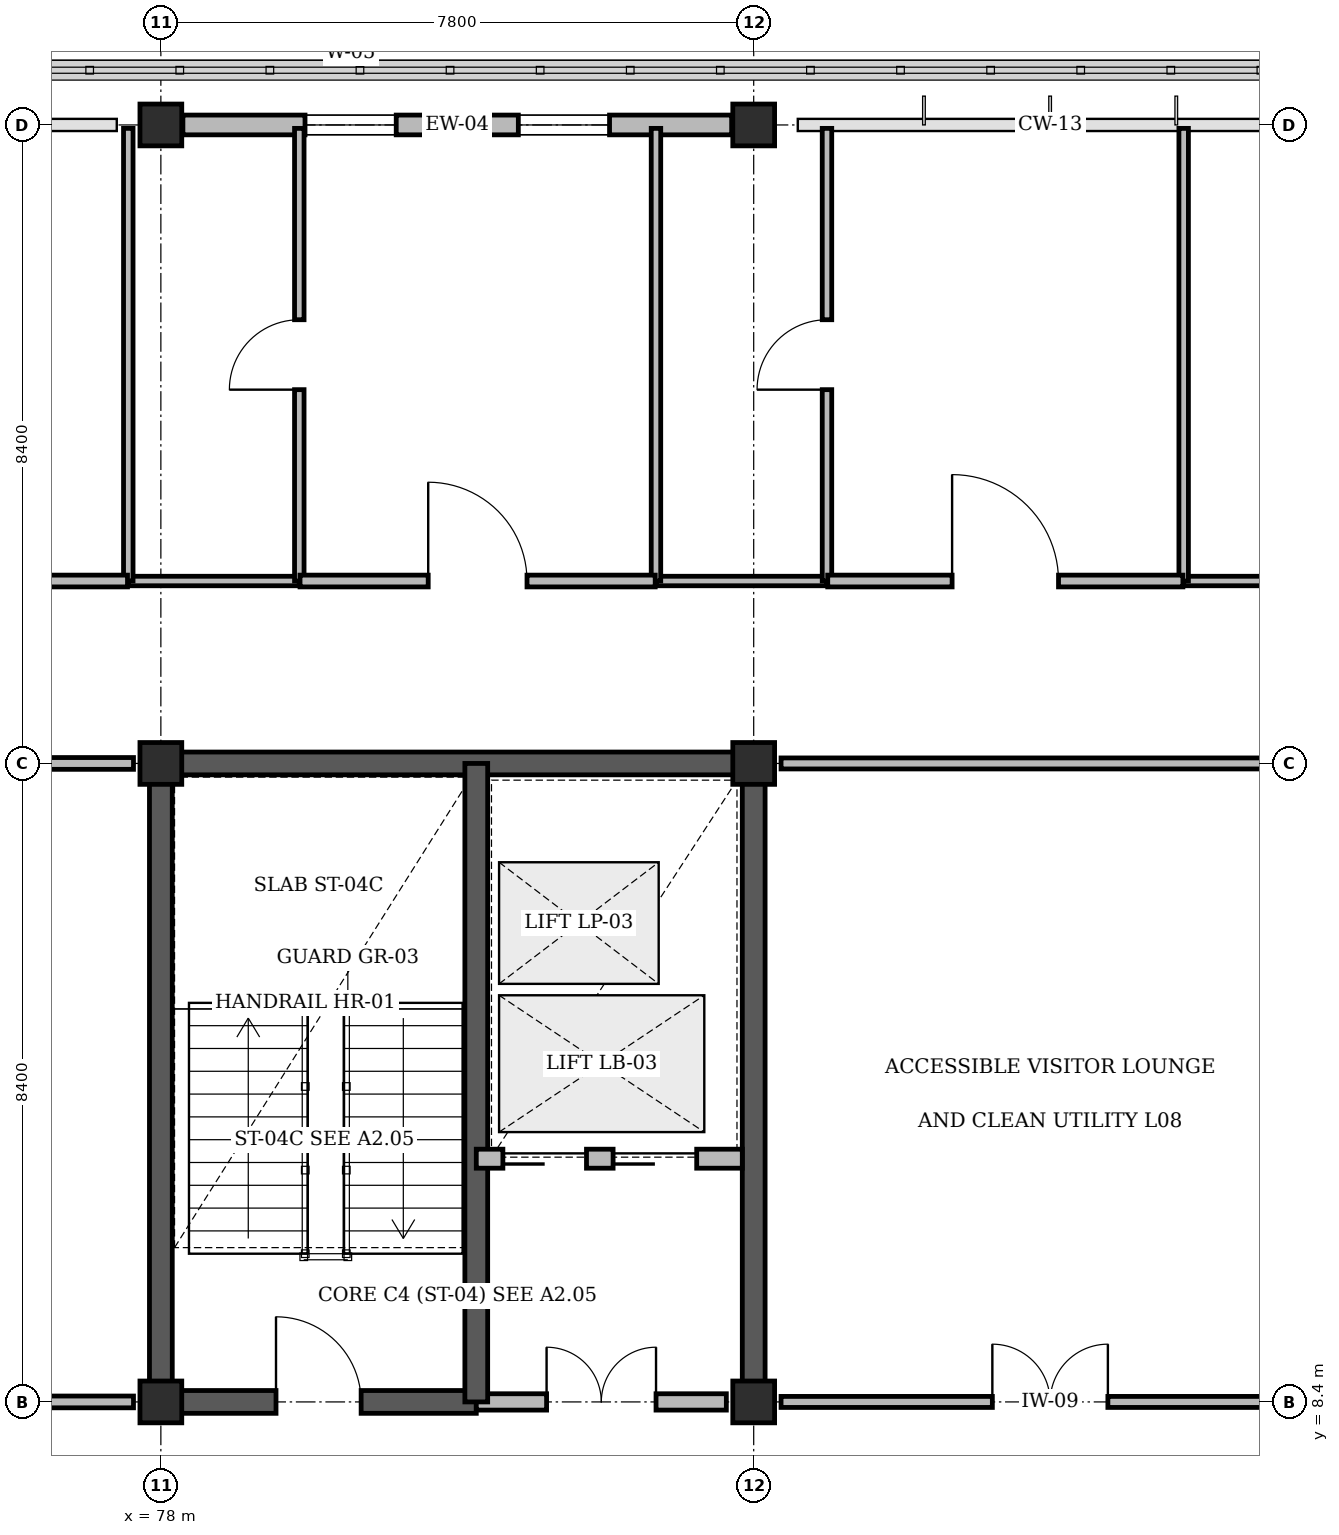
"""IFC4 building model, lengths in metres.
Left out: names, types, materials, properties, quantities, classifications, styles, units other than length and angle.
Written with IfcOpenShell. Run it as: python <this file> out.ifc"""

import sys

from ifc_helpers import new_model, si_unit, direction, frame, frame_2d, origin, origin_2d, place, context, subcontext, project, spatial, rectangle, extrude, element, fill, save


model = new_model("IFC4")
c1 = context("Model", 3, precision=1e-05, world=origin(), true_north=direction((0.0, 1.0)))
c2 = subcontext(c1, "Body", "Model", "MODEL_VIEW")
j1 = project(units=[si_unit("LENGTHUNIT", "METRE"), si_unit("PLANEANGLEUNIT", "RADIAN")], contexts=[c1])
p1 = place(None, origin())
s1 = spatial("IfcSite", under=j1, at=p1, CompositionType="ELEMENT")
p2 = place(p1, origin())
s2 = spatial("IfcBuilding", under=s1, at=p2, CompositionType="ELEMENT")
p3 = place(p2, frame((0.0, 0.0, 34.8)))
s3 = spatial("IfcBuildingStorey", under=s2, at=p3, CompositionType="ELEMENT", Elevation=34.8)
p4 = place(p3, frame((77.85, 16.8, 0.0), z_axis=(0.0, 0.0, 1.0), x_axis=(1.0, 0.0, 0.0)))
e1 = element("IfcWall", 1, at=p4, inside=s3, PredefinedType="SHEAR", context=c2, shape_type="SweptSolid", body=[
    extrude(rectangle(XDim=8.1, YDim=0.3, at=frame_2d((4.05, 0.0))), origin(), (0.0, 0.0, 1.0), 3.92),
])
for number, where, z_axis, x_axis in (
    (2, (78.0, 8.4, 0.0), (0.0, 0.0, 1.0), (0.0, 1.0, 0.0)),
    (3, (85.8, 8.4, 0.0), (0.0, 0.0, 1.0), (0.0, 1.0, 0.0)),
):
    element("IfcWall", number, at=place(p3, frame(where, z_axis=z_axis, x_axis=x_axis)), inside=s3, PredefinedType="SHEAR", context=c2, shape_type="SweptSolid", body=[
        extrude(rectangle(XDim=8.4, YDim=0.3, at=frame_2d((4.2, 0.0))), origin(), (0.0, 0.0, 1.0), 3.92),
    ])
for number, where, z_axis, x_axis in (
    (4, (78.0, 8.4, 0.0), (0.0, 0.0, 1.0), (1.0, 0.0, 0.0)),
    (5, (78.0, 16.8, 0.0), (0.0, 0.0, 1.0), (1.0, 0.0, 0.0)),
    (6, (78.0, 25.2, 0.0), (0.0, 0.0, 1.0), (1.0, 0.0, 0.0)),
    (7, (85.8, 8.4, 0.0), (0.0, 0.0, 1.0), (1.0, 0.0, 0.0)),
    (8, (85.8, 16.8, 0.0), (0.0, 0.0, 1.0), (1.0, 0.0, 0.0)),
    (9, (85.8, 25.2, 0.0), (0.0, 0.0, 1.0), (1.0, 0.0, 0.0)),
):
    element("IfcColumn", number, at=place(p3, frame(where, z_axis=z_axis, x_axis=x_axis)), inside=s3, PredefinedType="COLUMN", context=c2, shape_type="SweptSolid", body=[
        extrude(rectangle(XDim=0.55, YDim=0.55, at=origin_2d()), origin(), (0.0, 0.0, 1.0), 4.2),
    ])
p5 = place(p3, frame((78.29, 25.2, 0.0), z_axis=(0.0, 0.0, 1.0), x_axis=(1.0, 0.0, 0.0)))
e10 = element("IfcWall", 10, at=p5, inside=s3, PredefinedType="STANDARD", context=c2, shape_type="SweptSolid", body=[
    extrude(rectangle(XDim=7.22, YDim=0.26, at=frame_2d((3.61, 0.0))), origin(), (0.0, 0.0, 1.0), 3.355),
])
p6 = place(p5, frame((1.607, 0.0, 0.85)))
e11 = element("IfcOpeningElement", 11, at=p6, cuts=e10, PredefinedType="OPENING", context=c2, shape_type="SweptSolid", body=[
    extrude(rectangle(XDim=1.2, YDim=1.5, at=frame_2d((0.6, 0.75))), frame((0.0, 0.14, 0.0), z_axis=(0.0, -1.0, 0.0), x_axis=(1.0, 0.0, 0.0)), (0.0, 0.0, 1.0), 0.28),
])
p7 = place(p5, frame((4.413, 0.0, 0.85)))
e12 = element("IfcOpeningElement", 12, at=p7, cuts=e10, PredefinedType="OPENING", context=c2, shape_type="SweptSolid", body=[
    extrude(rectangle(XDim=1.2, YDim=1.5, at=frame_2d((0.6, 0.75))), frame((0.0, 0.14, 0.0), z_axis=(0.0, -1.0, 0.0), x_axis=(1.0, 0.0, 0.0)), (0.0, 0.0, 1.0), 0.28),
])
p8 = place(p3, frame((78.0, 8.4, 0.0), z_axis=(0.0, 0.0, 1.0), x_axis=(1.0, 0.0, 0.0)))
e13 = element("IfcWall", 13, at=p8, inside=s3, PredefinedType="SHEAR", context=c2, shape_type="SweptSolid", body=[
    extrude(rectangle(XDim=4.15, YDim=0.3, at=frame_2d((2.075, 0.0))), origin(), (0.0, 0.0, 1.0), 4.2),
])
p9 = place(p8, frame((1.515, 0.0, 0.0)))
e14 = element("IfcOpeningElement", 14, at=p9, cuts=e13, PredefinedType="OPENING", context=c2, shape_type="SweptSolid", body=[
    extrude(rectangle(XDim=1.12, YDim=2.15, at=frame_2d((0.56, 1.075))), frame((0.0, 0.16, 0.0), z_axis=(0.0, -1.0, 0.0), x_axis=(1.0, 0.0, 0.0)), (0.0, 0.0, 1.0), 0.32),
])
p10 = place(p3, frame((82.15, 8.4, 0.0), z_axis=(0.0, 0.0, 1.0), x_axis=(1.0, 0.0, 0.0)))
e15 = element("IfcWall", 15, at=p10, inside=s3, PredefinedType="STANDARD", context=c2, shape_type="SweptSolid", body=[
    extrude(rectangle(XDim=3.29, YDim=0.215, at=frame_2d((1.645, 0.0))), origin(), (0.0, 0.0, 1.0), 3.32),
])
p11 = place(p10, frame((0.925, 0.0, 0.0)))
e16 = element("IfcOpeningElement", 16, at=p11, cuts=e15, PredefinedType="OPENING", context=c2, shape_type="SweptSolid", body=[
    extrude(rectangle(XDim=1.44, YDim=2.2, at=frame_2d((0.72, 1.1))), frame((0.0, 0.118, 0.0), z_axis=(0.0, -1.0, 0.0), x_axis=(1.0, 0.0, 0.0)), (0.0, 0.0, 1.0), 0.235),
])
p12 = place(p3, frame((82.15, 8.4, 0.0), z_axis=(0.0, 0.0, 1.0), x_axis=(0.0, 1.0, 0.0)))
e17 = element("IfcWall", 17, at=p12, inside=s3, PredefinedType="SHEAR", context=c2, shape_type="SweptSolid", body=[
    extrude(rectangle(XDim=8.4, YDim=0.3, at=frame_2d((4.2, 0.0))), origin(), (0.0, 0.0, 1.0), 4.2),
])
p13 = place(p3, frame((82.15, 11.6, 0.0), z_axis=(0.0, 0.0, 1.0), x_axis=(1.0, 0.0, 0.0)))
e18 = element("IfcWall", 18, at=p13, inside=s3, PredefinedType="STANDARD", context=c2, shape_type="SweptSolid", body=[
    extrude(rectangle(XDim=3.5, YDim=0.25, at=frame_2d((1.75, 0.0))), origin(), (0.0, 0.0, 1.0), 3.9),
])
p14 = place(p13, frame((0.35, 0.0, 0.0)))
e19 = element("IfcOpeningElement", 19, at=p14, cuts=e18, PredefinedType="OPENING", context=c2, shape_type="SweptSolid", body=[
    extrude(rectangle(XDim=1.1, YDim=2.2, at=frame_2d((0.55, 1.1))), frame((0.0, 0.135, 0.0), z_axis=(0.0, -1.0, 0.0), x_axis=(1.0, 0.0, 0.0)), (0.0, 0.0, 1.0), 0.27),
])
p15 = place(p13, frame((1.8, 0.0, 0.0)))
e20 = element("IfcOpeningElement", 20, at=p15, cuts=e18, PredefinedType="OPENING", context=c2, shape_type="SweptSolid", body=[
    extrude(rectangle(XDim=1.1, YDim=2.2, at=frame_2d((0.55, 1.1))), frame((0.0, 0.135, 0.0), z_axis=(0.0, -1.0, 0.0), x_axis=(1.0, 0.0, 0.0)), (0.0, 0.0, 1.0), 0.27),
])
p16 = place(p3, frame((77.571, 19.2, 0.0), z_axis=(0.0, 0.0, 1.0), x_axis=(1.0, 0.0, 0.0)))
e21 = element("IfcWall", 21, at=p16, inside=s3, PredefinedType="PARTITIONING", context=c2, shape_type="SweptSolid", body=[
    extrude(rectangle(XDim=2.25, YDim=0.125, at=frame_2d((1.125, 0.0))), origin(), (0.0, 0.0, 1.0), 3.9),
])
p17 = place(p3, frame((77.571, 19.2, 0.0), z_axis=(0.0, 0.0, 1.0), x_axis=(0.0, 1.0, 0.0)))
e22 = element("IfcWall", 22, at=p17, inside=s3, PredefinedType="PARTITIONING", context=c2, shape_type="SweptSolid", body=[
    extrude(rectangle(XDim=5.955, YDim=0.125, at=frame_2d((2.978, 0.0))), origin(), (0.0, 0.0, 1.0), 3.32),
])
p18 = place(p3, frame((79.821, 19.2, 0.0), z_axis=(0.0, 0.0, 1.0), x_axis=(0.0, 1.0, 0.0)))
e23 = element("IfcWall", 23, at=p18, inside=s3, PredefinedType="PARTITIONING", context=c2, shape_type="SweptSolid", body=[
    extrude(rectangle(XDim=5.955, YDim=0.125, at=frame_2d((2.978, 0.0))), origin(), (0.0, 0.0, 1.0), 3.9),
])
p19 = place(p18, frame((2.518, 0.0, 0.0)))
e24 = element("IfcOpeningElement", 24, at=p19, cuts=e23, PredefinedType="OPENING", context=c2, shape_type="SweptSolid", body=[
    extrude(rectangle(XDim=0.92, YDim=2.1, at=frame_2d((0.46, 1.05))), frame((0.0, 0.073, 0.0), z_axis=(0.0, -1.0, 0.0), x_axis=(1.0, 0.0, 0.0)), (0.0, 0.0, 1.0), 0.145),
])
p20 = place(p3, frame((84.514, 19.2, 0.0), z_axis=(0.0, 0.0, 1.0), x_axis=(1.0, 0.0, 0.0)))
e25 = element("IfcWall", 25, at=p20, inside=s3, PredefinedType="PARTITIONING", context=c2, shape_type="SweptSolid", body=[
    extrude(rectangle(XDim=2.25, YDim=0.125, at=frame_2d((1.125, 0.0))), origin(), (0.0, 0.0, 1.0), 3.9),
])
p21 = place(p3, frame((84.514, 19.2, 0.0), z_axis=(0.0, 0.0, 1.0), x_axis=(0.0, 1.0, 0.0)))
e26 = element("IfcWall", 26, at=p21, inside=s3, PredefinedType="PARTITIONING", context=c2, shape_type="SweptSolid", body=[
    extrude(rectangle(XDim=5.955, YDim=0.125, at=frame_2d((2.978, 0.0))), origin(), (0.0, 0.0, 1.0), 3.9),
])
p22 = place(p3, frame((86.764, 19.2, 0.0), z_axis=(0.0, 0.0, 1.0), x_axis=(0.0, 1.0, 0.0)))
e27 = element("IfcWall", 27, at=p22, inside=s3, PredefinedType="PARTITIONING", context=c2, shape_type="SweptSolid", body=[
    extrude(rectangle(XDim=5.955, YDim=0.125, at=frame_2d((2.978, 0.0))), origin(), (0.0, 0.0, 1.0), 3.9),
])
p23 = place(p22, frame((2.518, 0.0, 0.0)))
e28 = element("IfcOpeningElement", 28, at=p23, cuts=e27, PredefinedType="OPENING", context=c2, shape_type="SweptSolid", body=[
    extrude(rectangle(XDim=0.92, YDim=2.1, at=frame_2d((0.46, 1.05))), frame((0.0, 0.073, 0.0), z_axis=(0.0, -1.0, 0.0), x_axis=(1.0, 0.0, 0.0)), (0.0, 0.0, 1.0), 0.145),
])
p24 = place(p3, frame((91.457, 19.2, 0.0), z_axis=(0.0, 0.0, 1.0), x_axis=(1.0, 0.0, 0.0)))
e29 = element("IfcWall", 29, at=p24, inside=s3, PredefinedType="PARTITIONING", context=c2, shape_type="SweptSolid", body=[
    extrude(rectangle(XDim=2.25, YDim=0.125, at=frame_2d((1.125, 0.0))), origin(), (0.0, 0.0, 1.0), 3.9),
])
p25 = place(p3, frame((91.457, 19.2, 0.0), z_axis=(0.0, 0.0, 1.0), x_axis=(0.0, 1.0, 0.0)))
e30 = element("IfcWall", 30, at=p25, inside=s3, PredefinedType="PARTITIONING", context=c2, shape_type="SweptSolid", body=[
    extrude(rectangle(XDim=5.955, YDim=0.125, at=frame_2d((2.978, 0.0))), origin(), (0.0, 0.0, 1.0), 3.9),
])
p26 = place(p3, frame((72.889, 19.2, 0.0), z_axis=(0.0, 0.0, 1.0), x_axis=(1.0, 0.0, 0.0)))
e31 = element("IfcWall", 31, at=p26, inside=s3, PredefinedType="PARTITIONING", context=c2, shape_type="SweptSolid", body=[
    extrude(rectangle(XDim=4.672, YDim=0.155, at=frame_2d((2.336, 0.0))), origin(), (0.0, 0.0, 1.0), 3.9),
])
p27 = place(p26, frame((1.636, 0.0, 0.0)))
e32 = element("IfcOpeningElement", 32, at=p27, cuts=e31, PredefinedType="OPENING", context=c2, shape_type="SweptSolid", body=[
    extrude(rectangle(XDim=1.4, YDim=2.2, at=frame_2d((0.7, 1.1))), frame((0.0, 0.087, 0.0), z_axis=(0.0, -1.0, 0.0), x_axis=(1.0, 0.0, 0.0)), (0.0, 0.0, 1.0), 0.175),
])
p28 = place(p3, frame((79.831, 19.2, 0.0), z_axis=(0.0, 0.0, 1.0), x_axis=(1.0, 0.0, 0.0)))
e33 = element("IfcWall", 33, at=p28, inside=s3, PredefinedType="PARTITIONING", context=c2, shape_type="SweptSolid", body=[
    extrude(rectangle(XDim=4.673, YDim=0.155, at=frame_2d((2.336, 0.0))), origin(), (0.0, 0.0, 1.0), 3.9),
])
p29 = place(p28, frame((1.687, 0.0, 0.0)))
e34 = element("IfcOpeningElement", 34, at=p29, cuts=e33, PredefinedType="OPENING", context=c2, shape_type="SweptSolid", body=[
    extrude(rectangle(XDim=1.3, YDim=2.15, at=frame_2d((0.65, 1.075))), frame((0.0, 0.087, 0.0), z_axis=(0.0, -1.0, 0.0), x_axis=(1.0, 0.0, 0.0)), (0.0, 0.0, 1.0), 0.175),
])
p30 = place(p3, frame((86.774, 19.2, 0.0), z_axis=(0.0, 0.0, 1.0), x_axis=(1.0, 0.0, 0.0)))
e35 = element("IfcWall", 35, at=p30, inside=s3, PredefinedType="PARTITIONING", context=c2, shape_type="SweptSolid", body=[
    extrude(rectangle(XDim=4.673, YDim=0.155, at=frame_2d((2.336, 0.0))), origin(), (0.0, 0.0, 1.0), 3.9),
])
p31 = place(p30, frame((1.636, 0.0, 0.0)))
e36 = element("IfcOpeningElement", 36, at=p31, cuts=e35, PredefinedType="OPENING", context=c2, shape_type="SweptSolid", body=[
    extrude(rectangle(XDim=1.4, YDim=2.2, at=frame_2d((0.7, 1.1))), frame((0.0, 0.087, 0.0), z_axis=(0.0, -1.0, 0.0), x_axis=(1.0, 0.0, 0.0)), (0.0, 0.0, 1.0), 0.175),
])
for number, where, z_axis, x_axis in (
    (37, (73.2, 8.4, 0.0), (0.0, 0.0, 1.0), (1.0, 0.0, 0.0)),
    (38, (73.2, 16.8, 0.0), (0.0, 0.0, 1.0), (1.0, 0.0, 0.0)),
):
    element("IfcWall", number, at=place(p3, frame(where, z_axis=z_axis, x_axis=x_axis)), inside=s3, PredefinedType="PARTITIONING", context=c2, shape_type="SweptSolid", body=[
        extrude(rectangle(XDim=4.44, YDim=0.155, at=frame_2d((2.22, 0.0))), origin(), (0.0, 0.0, 1.0), 3.32),
    ])
p32 = place(p3, frame((86.16, 8.4, 0.0), z_axis=(0.0, 0.0, 1.0), x_axis=(1.0, 0.0, 0.0)))
e39 = element("IfcWall", 39, at=p32, inside=s3, PredefinedType="PARTITIONING", context=c2, shape_type="SweptSolid", body=[
    extrude(rectangle(XDim=7.08, YDim=0.145, at=frame_2d((3.54, 0.0))), origin(), (0.0, 0.0, 1.0), 3.32),
])
p33 = place(p32, frame((2.78, 0.0, 0.0)))
e40 = element("IfcOpeningElement", 40, at=p33, cuts=e39, PredefinedType="OPENING", context=c2, shape_type="SweptSolid", body=[
    extrude(rectangle(XDim=1.52, YDim=2.2, at=frame_2d((0.76, 1.1))), frame((0.0, 0.083, 0.0), z_axis=(0.0, -1.0, 0.0), x_axis=(1.0, 0.0, 0.0)), (0.0, 0.0, 1.0), 0.165),
])
p34 = place(p3, frame((86.16, 16.8, 0.0), z_axis=(0.0, 0.0, 1.0), x_axis=(1.0, 0.0, 0.0)))
e41 = element("IfcWall", 41, at=p34, inside=s3, PredefinedType="PARTITIONING", context=c2, shape_type="SweptSolid", body=[
    extrude(rectangle(XDim=7.08, YDim=0.145, at=frame_2d((3.54, 0.0))), origin(), (0.0, 0.0, 1.0), 3.32),
])
p35 = place(p6, origin())
e42 = element("IfcWindow", 42, at=p35, inside=s3, PartitioningType="SINGLE_PANEL", PredefinedType="WINDOW", context=c2, shape_type="SweptSolid", body=[
    extrude(rectangle(XDim=1.2, YDim=1.5, at=frame_2d((0.6, 0.75))), frame((0.0, 0.03, 0.0), z_axis=(0.0, -1.0, 0.0), x_axis=(1.0, 0.0, 0.0)), (0.0, 0.0, 1.0), 0.06),
])
fill(e11, e42)
p36 = place(p7, origin())
e43 = element("IfcWindow", 43, at=p36, inside=s3, PartitioningType="SINGLE_PANEL", PredefinedType="WINDOW", context=c2, shape_type="SweptSolid", body=[
    extrude(rectangle(XDim=1.2, YDim=1.5, at=frame_2d((0.6, 0.75))), frame((0.0, 0.03, 0.0), z_axis=(0.0, -1.0, 0.0), x_axis=(1.0, 0.0, 0.0)), (0.0, 0.0, 1.0), 0.06),
])
fill(e12, e43)
p37 = place(p9, origin())
e44 = element("IfcDoor", 44, at=p37, inside=s3, OperationType="SINGLE_SWING_LEFT", PredefinedType="DOOR", context=c2, shape_type="SweptSolid", body=[
    extrude(rectangle(XDim=1.12, YDim=2.15, at=frame_2d((0.56, 1.075))), frame((0.0, 0.025, 0.0), z_axis=(0.0, -1.0, 0.0), x_axis=(1.0, 0.0, 0.0)), (0.0, 0.0, 1.0), 0.05),
])
fill(e14, e44)
p38 = place(p11, origin())
e45 = element("IfcDoor", 45, at=p38, inside=s3, OperationType="DOUBLE_DOOR_SINGLE_SWING", PredefinedType="DOOR", context=c2, shape_type="SweptSolid", body=[
    extrude(rectangle(XDim=1.44, YDim=2.2, at=frame_2d((0.72, 1.1))), frame((0.0, 0.025, 0.0), z_axis=(0.0, -1.0, 0.0), x_axis=(1.0, 0.0, 0.0)), (0.0, 0.0, 1.0), 0.05),
])
fill(e16, e45)
p39 = place(p14, origin())
e46 = element("IfcDoor", 46, at=p39, inside=s3, OperationType="SLIDING_TO_LEFT", PredefinedType="DOOR", context=c2, shape_type="SweptSolid", body=[
    extrude(rectangle(XDim=1.1, YDim=2.2, at=frame_2d((0.55, 1.1))), frame((0.0, 0.025, 0.0), z_axis=(0.0, -1.0, 0.0), x_axis=(1.0, 0.0, 0.0)), (0.0, 0.0, 1.0), 0.05),
])
fill(e19, e46)
p40 = place(p15, origin())
e47 = element("IfcDoor", 47, at=p40, inside=s3, OperationType="SLIDING_TO_LEFT", PredefinedType="DOOR", context=c2, shape_type="SweptSolid", body=[
    extrude(rectangle(XDim=1.1, YDim=2.2, at=frame_2d((0.55, 1.1))), frame((0.0, 0.025, 0.0), z_axis=(0.0, -1.0, 0.0), x_axis=(1.0, 0.0, 0.0)), (0.0, 0.0, 1.0), 0.05),
])
fill(e20, e47)
p41 = place(p19, origin())
e48 = element("IfcDoor", 48, at=p41, inside=s3, OperationType="SINGLE_SWING_LEFT", PredefinedType="DOOR", context=c2, shape_type="SweptSolid", body=[
    extrude(rectangle(XDim=0.92, YDim=2.1, at=frame_2d((0.46, 1.05))), frame((0.0, 0.025, 0.0), z_axis=(0.0, -1.0, 0.0), x_axis=(1.0, 0.0, 0.0)), (0.0, 0.0, 1.0), 0.05),
])
fill(e24, e48)
p42 = place(p23, origin())
e49 = element("IfcDoor", 49, at=p42, inside=s3, OperationType="SINGLE_SWING_LEFT", PredefinedType="DOOR", context=c2, shape_type="SweptSolid", body=[
    extrude(rectangle(XDim=0.92, YDim=2.1, at=frame_2d((0.46, 1.05))), frame((0.0, 0.025, 0.0), z_axis=(0.0, -1.0, 0.0), x_axis=(1.0, 0.0, 0.0)), (0.0, 0.0, 1.0), 0.05),
])
fill(e28, e49)
p43 = place(p29, origin())
e50 = element("IfcDoor", 50, at=p43, inside=s3, OperationType="SINGLE_SWING_LEFT", PredefinedType="DOOR", context=c2, shape_type="SweptSolid", body=[
    extrude(rectangle(XDim=1.3, YDim=2.15, at=frame_2d((0.65, 1.075))), frame((0.0, 0.025, 0.0), z_axis=(0.0, -1.0, 0.0), x_axis=(1.0, 0.0, 0.0)), (0.0, 0.0, 1.0), 0.05),
])
fill(e34, e50)
p44 = place(p31, origin())
e51 = element("IfcDoor", 51, at=p44, inside=s3, OperationType="SINGLE_SWING_LEFT", PredefinedType="DOOR", context=c2, shape_type="SweptSolid", body=[
    extrude(rectangle(XDim=1.4, YDim=2.2, at=frame_2d((0.7, 1.1))), frame((0.0, 0.025, 0.0), z_axis=(0.0, -1.0, 0.0), x_axis=(1.0, 0.0, 0.0)), (0.0, 0.0, 1.0), 0.05),
])
fill(e36, e51)
p45 = place(p33, origin())
e52 = element("IfcDoor", 52, at=p45, inside=s3, OperationType="DOUBLE_DOOR_SINGLE_SWING", PredefinedType="DOOR", context=c2, shape_type="SweptSolid", body=[
    extrude(rectangle(XDim=1.52, YDim=2.2, at=frame_2d((0.76, 1.1))), frame((0.0, 0.025, 0.0), z_axis=(0.0, -1.0, 0.0), x_axis=(1.0, 0.0, 0.0)), (0.0, 0.0, 1.0), 0.05),
])
fill(e40, e52)
save(model, sys.argv[1])
